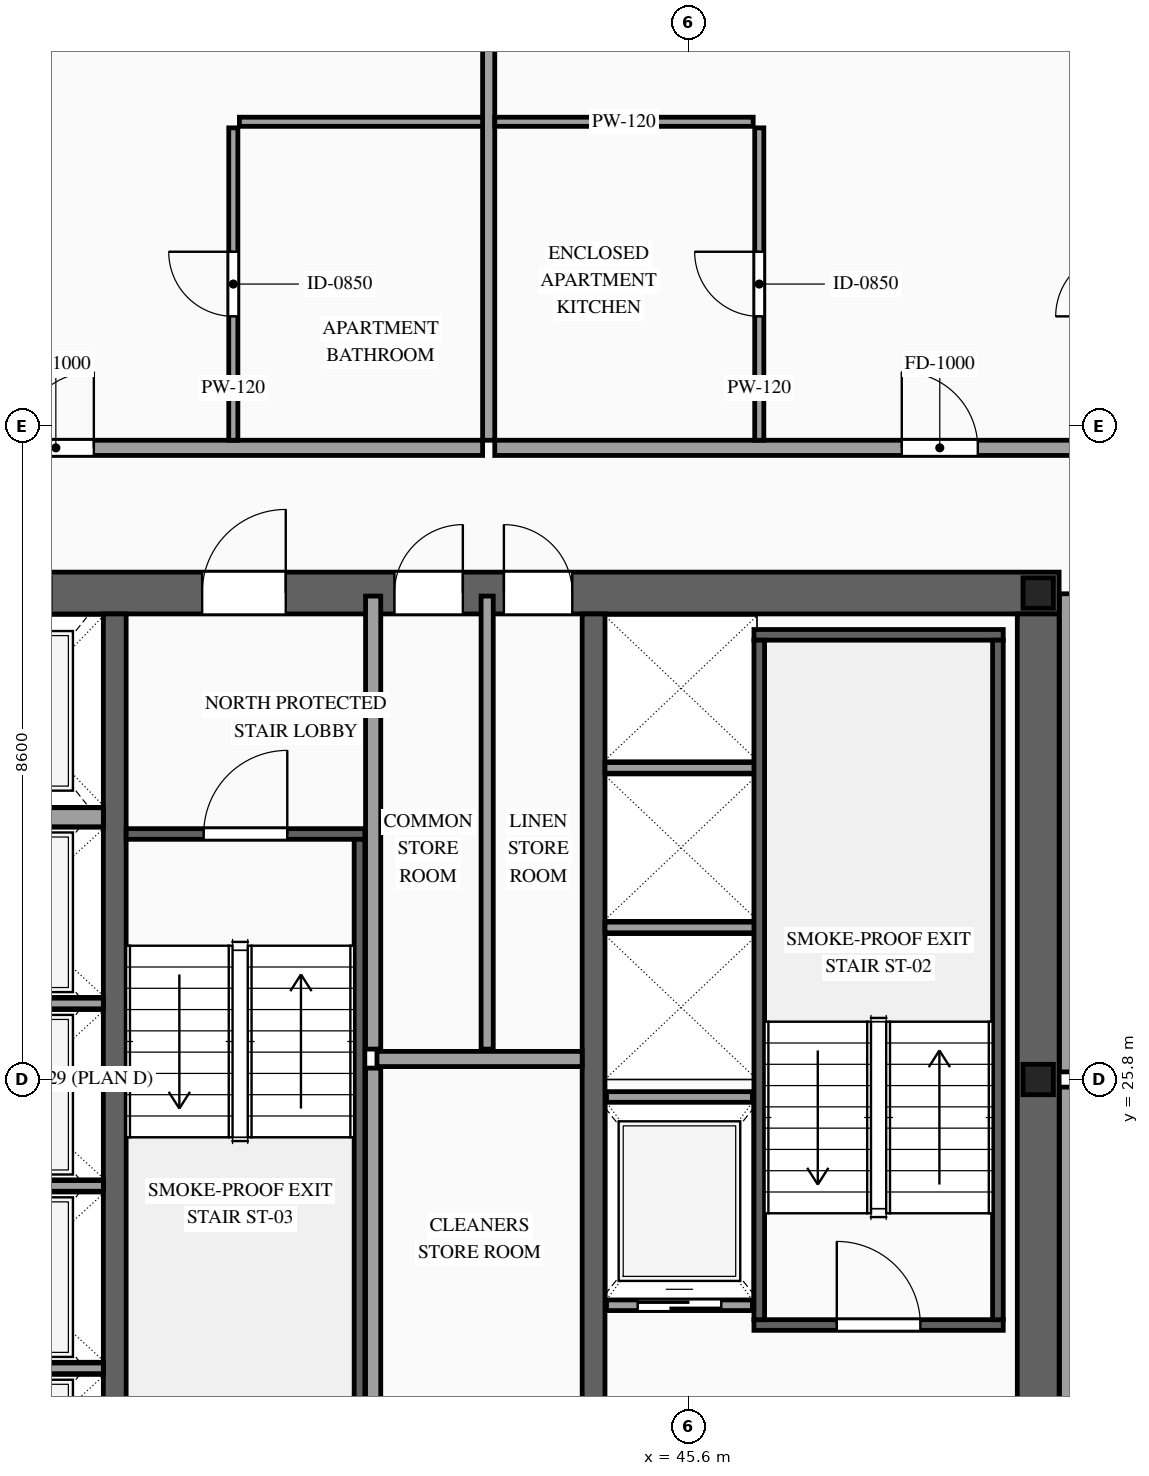
"""IFC4 building model, lengths in metres.
Left out: names, types, materials, properties, quantities, classifications, styles, units other than length and angle.
Written with IfcOpenShell. Run it as: python <this file> out.ifc"""

import sys

from ifc_helpers import new_model, si_unit, direction, frame, frame_2d, origin, origin_2d, place, context, subcontext, project, spatial, rectangle, i_section, extrude, source, transform, mapped, element, fill, save


model = new_model("IFC4")
c1 = context("Model", 3, precision=1e-05, world=origin(), true_north=direction((0.0, 1.0)))
c2 = subcontext(c1, "Body", "Model", "MODEL_VIEW")
j1 = project(units=[si_unit("LENGTHUNIT", "METRE"), si_unit("PLANEANGLEUNIT", "RADIAN")], contexts=[c1])
p1 = place(None, origin())
s1 = spatial("IfcSite", under=j1, at=p1, CompositionType="ELEMENT")
p2 = place(p1, origin())
s2 = spatial("IfcBuilding", under=s1, at=p2, CompositionType="ELEMENT")
p3 = place(p2, frame((0.0, 0.0, 241.6)))
s3 = spatial("IfcBuildingStorey", under=s2, at=p3, CompositionType="ELEMENT", Elevation=241.6)
p4 = place(p3, frame((23.525, 32.2, 0.0), z_axis=(0.0, 0.0, 1.0), x_axis=(1.0, 0.0, 0.0)))
e1 = element("IfcWall", 1, at=p4, inside=s3, PredefinedType="SHEAR", context=c2, shape_type="SweptSolid", body=[
    extrude(rectangle(XDim=26.95, YDim=0.55, at=frame_2d((13.475, 0.0))), origin(), (0.0, 0.0, 1.0), 3.5),
])
p5 = place(p4, frame((4.545, 0.0, 0.0)))
e2 = element("IfcOpeningElement", 2, at=p5, cuts=e1, PredefinedType="OPENING", context=c2, shape_type="SweptSolid", body=[
    extrude(rectangle(XDim=0.9, YDim=2.15, at=frame_2d((0.45, 1.075))), frame((0.0, 0.29, 0.0), z_axis=(0.0, -1.0, 0.0), x_axis=(1.0, 0.0, 0.0)), (0.0, 0.0, 1.0), 0.58),
])
p6 = place(p4, frame((9.825, 0.0, 0.0)))
e3 = element("IfcOpeningElement", 3, at=p6, cuts=e1, PredefinedType="OPENING", context=c2, shape_type="SweptSolid", body=[
    extrude(rectangle(XDim=1.1, YDim=2.2, at=frame_2d((0.55, 1.1))), frame((0.0, 0.29, 0.0), z_axis=(0.0, -1.0, 0.0), x_axis=(1.0, 0.0, 0.0)), (0.0, 0.0, 1.0), 0.58),
])
p7 = place(p4, frame((15.675, 0.0, 0.0)))
e4 = element("IfcOpeningElement", 4, at=p7, cuts=e1, PredefinedType="OPENING", context=c2, shape_type="SweptSolid", body=[
    extrude(rectangle(XDim=1.1, YDim=2.2, at=frame_2d((0.55, 1.1))), frame((0.0, 0.29, 0.0), z_axis=(0.0, -1.0, 0.0), x_axis=(1.0, 0.0, 0.0)), (0.0, 0.0, 1.0), 0.58),
])
p8 = place(p4, frame((18.205, 0.0, 0.0)))
e5 = element("IfcOpeningElement", 5, at=p8, cuts=e1, PredefinedType="OPENING", context=c2, shape_type="SweptSolid", body=[
    extrude(rectangle(XDim=0.9, YDim=2.15, at=frame_2d((0.45, 1.075))), frame((0.0, 0.29, 0.0), z_axis=(0.0, -1.0, 0.0), x_axis=(1.0, 0.0, 0.0)), (0.0, 0.0, 1.0), 0.58),
])
p9 = place(p4, frame((19.645, 0.0, 0.0)))
e6 = element("IfcOpeningElement", 6, at=p9, cuts=e1, PredefinedType="OPENING", context=c2, shape_type="SweptSolid", body=[
    extrude(rectangle(XDim=0.9, YDim=2.15, at=frame_2d((0.45, 1.075))), frame((0.0, 0.29, 0.0), z_axis=(0.0, -1.0, 0.0), x_axis=(1.0, 0.0, 0.0)), (0.0, 0.0, 1.0), 0.58),
])
m1 = source(origin(), c2, "Body", "SweptSolid", [
    extrude(rectangle(XDim=12.25, YDim=0.55, at=frame_2d((6.125, 0.0))), origin(), (0.0, 0.0, 1.0), 3.5),
])
p10 = place(p3, frame((50.2, 19.675, 0.0), z_axis=(0.0, 0.0, 1.0), x_axis=(0.0, 1.0, 0.0)))
e7 = element("IfcWall", 7, at=p10, inside=s3, PredefinedType="SHEAR", context=c2, shape_type="MappedRepresentation", body=[
    mapped(m1, transform((0.0, 0.0, 0.0), scale=1.0)),
])
m2 = source(origin(), c2, "Body", "SweptSolid", [
    extrude(rectangle(XDim=12.25, YDim=0.3, at=frame_2d((6.125, 0.0))), origin(), (0.0, 0.0, 1.0), 3.5),
])
for number, where, z_axis, x_axis in (
    (8, (38.05, 19.675, 0.0), (0.0, 0.0, 1.0), (0.0, 1.0, 0.0)),
    (9, (44.35, 19.675, 0.0), (0.0, 0.0, 1.0), (0.0, 1.0, 0.0)),
):
    element("IfcWall", number, at=place(p3, frame(where, z_axis=z_axis, x_axis=x_axis)), inside=s3, PredefinedType="SOLIDWALL", context=c2, shape_type="MappedRepresentation", body=[
        mapped(m2, transform((0.0, 0.0, 0.0), scale=1.0)),
    ])
m3 = source(origin(), c2, "Body", "SweptSolid", [
    extrude(i_section(OverallWidth=0.4, OverallDepth=0.4, WebThickness=0.013, FlangeThickness=0.021, at=origin_2d()), origin(), (0.0, 0.0, 1.0), 3.5),
])
for number, where, z_axis, x_axis in (
    (10, (50.2, 25.8, 0.0), (0.0, 0.0, 1.0), (1.0, 0.0, 0.0)),
    (11, (50.2, 32.2, 0.0), (0.0, 0.0, 1.0), (1.0, 0.0, 0.0)),
):
    element("IfcColumn", number, at=place(p3, frame(where, z_axis=z_axis, x_axis=x_axis)), inside=s3, PredefinedType="COLUMN", context=c2, shape_type="MappedRepresentation", body=[
        mapped(m3, transform((0.0, 0.0, 0.0), scale=1.0)),
    ])
p11 = place(p3, frame((44.52, 22.83, 0.0), z_axis=(0.0, 0.0, 1.0), x_axis=(1.0, 0.0, 0.0)))
e12 = element("IfcWall", 12, at=p11, inside=s3, PredefinedType="SOLIDWALL", context=c2, shape_type="SweptSolid", body=[
    extrude(rectangle(XDim=1.92, YDim=0.14, at=frame_2d((0.96, 0.0))), origin(), (0.0, 0.0, 1.0), 3.28),
])
p12 = place(p11, frame((0.41, 0.0, 0.0)))
e13 = element("IfcOpeningElement", 13, at=p12, cuts=e12, PredefinedType="OPENING", context=c2, shape_type="SweptSolid", body=[
    extrude(rectangle(XDim=1.1, YDim=2.2, at=frame_2d((0.55, 1.1))), frame((0.0, 0.085, 0.0), z_axis=(0.0, -1.0, 0.0), x_axis=(1.0, 0.0, 0.0)), (0.0, 0.0, 1.0), 0.17),
])
m4 = source(origin(), c2, "Body", "SweptSolid", [
    extrude(rectangle(XDim=1.92, YDim=0.14, at=frame_2d((0.96, 0.0))), origin(), (0.0, 0.0, 1.0), 3.28),
])
p13 = place(p3, frame((44.52, 25.57, 0.0), z_axis=(0.0, 0.0, 1.0), x_axis=(1.0, 0.0, 0.0)))
e14 = element("IfcWall", 14, at=p13, inside=s3, PredefinedType="SOLIDWALL", context=c2, shape_type="MappedRepresentation", body=[
    mapped(m4, transform((0.0, 0.0, 0.0), scale=1.0)),
])
m5 = source(origin(), c2, "Body", "SweptSolid", [
    extrude(rectangle(XDim=2.4, YDim=0.14, at=frame_2d((1.2, 0.0))), origin(), (0.0, 0.0, 1.0), 3.28),
])
for number, where, z_axis, x_axis in (
    (15, (35.5, 22.0, 0.0), (0.0, 0.0, 1.0), (1.0, 0.0, 0.0)),
    (16, (35.5, 24.4, 0.0), (0.0, 0.0, 1.0), (1.0, 0.0, 0.0)),
    (17, (35.5, 26.8, 0.0), (0.0, 0.0, 1.0), (1.0, 0.0, 0.0)),
):
    element("IfcWall", number, at=place(p3, frame(where, z_axis=z_axis, x_axis=x_axis)), inside=s3, PredefinedType="SOLIDWALL", context=c2, shape_type="MappedRepresentation", body=[
        mapped(m5, transform((0.0, 0.0, 0.0), scale=1.0)),
    ])
m6 = source(origin(), c2, "Body", "SweptSolid", [
    extrude(rectangle(XDim=2.4, YDim=0.25, at=frame_2d((1.2, 0.0))), origin(), (0.0, 0.0, 1.0), 3.28),
])
p14 = place(p3, frame((35.5, 29.25, 0.0), z_axis=(0.0, 0.0, 1.0), x_axis=(1.0, 0.0, 0.0)))
e18 = element("IfcWall", 18, at=p14, inside=s3, PredefinedType="SOLIDWALL", context=c2, shape_type="MappedRepresentation", body=[
    mapped(m6, transform((0.0, 0.0, 0.0), scale=1.0)),
])
m7 = source(origin(), c2, "Body", "SweptSolid", [
    extrude(rectangle(XDim=2.0, YDim=0.14, at=frame_2d((1.0, 0.0))), origin(), (0.0, 0.0, 1.0), 3.28),
])
for number, where, z_axis, x_axis in (
    (19, (44.5, 27.8, 0.0), (0.0, 0.0, 1.0), (1.0, 0.0, 0.0)),
    (20, (44.5, 29.9, 0.0), (0.0, 0.0, 1.0), (1.0, 0.0, 0.0)),
):
    element("IfcWall", number, at=place(p3, frame(where, z_axis=z_axis, x_axis=x_axis)), inside=s3, PredefinedType="SOLIDWALL", context=c2, shape_type="MappedRepresentation", body=[
        mapped(m7, transform((0.0, 0.0, 0.0), scale=1.0)),
    ])
p15 = place(p3, frame((46.46, 22.57, 0.0), z_axis=(0.0, 0.0, 1.0), x_axis=(1.0, 0.0, 0.0)))
e21 = element("IfcWall", 21, at=p15, inside=s3, PredefinedType="SOLIDWALL", context=c2, shape_type="SweptSolid", body=[
    extrude(rectangle(XDim=3.28, YDim=0.14, at=frame_2d((1.64, 0.0))), origin(), (0.0, 0.0, 1.0), 3.28),
])
p16 = place(p15, frame((1.09, 0.0, 0.0)))
e22 = element("IfcOpeningElement", 22, at=p16, cuts=e21, PredefinedType="OPENING", context=c2, shape_type="SweptSolid", body=[
    extrude(rectangle(XDim=1.1, YDim=2.2, at=frame_2d((0.55, 1.1))), frame((0.0, 0.085, 0.0), z_axis=(0.0, -1.0, 0.0), x_axis=(1.0, 0.0, 0.0)), (0.0, 0.0, 1.0), 0.17),
])
m8 = source(origin(), c2, "Body", "SweptSolid", [
    extrude(rectangle(XDim=3.28, YDim=0.14, at=frame_2d((1.64, 0.0))), origin(), (0.0, 0.0, 1.0), 3.28),
])
p17 = place(p3, frame((46.46, 31.65, 0.0), z_axis=(0.0, 0.0, 1.0), x_axis=(1.0, 0.0, 0.0)))
e23 = element("IfcWall", 23, at=p17, inside=s3, PredefinedType="SOLIDWALL", context=c2, shape_type="MappedRepresentation", body=[
    mapped(m8, transform((0.0, 0.0, 0.0), scale=1.0)),
])
m9 = source(origin(), c2, "Body", "SweptSolid", [
    extrude(rectangle(XDim=8.94, YDim=0.14, at=frame_2d((4.47, 0.0))), origin(), (0.0, 0.0, 1.0), 3.28),
])
for number, where, z_axis, x_axis in (
    (24, (46.53, 22.64, 0.0), (0.0, 0.0, 1.0), (0.0, 1.0, 0.0)),
    (25, (49.67, 22.64, 0.0), (0.0, 0.0, 1.0), (0.0, 1.0, 0.0)),
):
    element("IfcWall", number, at=place(p3, frame(where, z_axis=z_axis, x_axis=x_axis)), inside=s3, PredefinedType="SOLIDWALL", context=c2, shape_type="MappedRepresentation", body=[
        mapped(m9, transform((0.0, 0.0, 0.0), scale=1.0)),
    ])
p18 = place(p3, frame((38.2, 29.03, 0.0), z_axis=(0.0, 0.0, 1.0), x_axis=(1.0, 0.0, 0.0)))
e26 = element("IfcWall", 26, at=p18, inside=s3, PredefinedType="SOLIDWALL", context=c2, shape_type="SweptSolid", body=[
    extrude(rectangle(XDim=3.14, YDim=0.14, at=frame_2d((1.57, 0.0))), origin(), (0.0, 0.0, 1.0), 3.28),
])
p19 = place(p18, frame((1.02, 0.0, 0.0)))
e27 = element("IfcOpeningElement", 27, at=p19, cuts=e26, PredefinedType="OPENING", context=c2, shape_type="SweptSolid", body=[
    extrude(rectangle(XDim=1.1, YDim=2.2, at=frame_2d((0.55, 1.1))), frame((0.0, 0.085, 0.0), z_axis=(0.0, -1.0, 0.0), x_axis=(1.0, 0.0, 0.0)), (0.0, 0.0, 1.0), 0.17),
])
m10 = source(origin(), c2, "Body", "SweptSolid", [
    extrude(rectangle(XDim=8.94, YDim=0.14, at=frame_2d((4.47, 0.0))), origin(), (0.0, 0.0, 1.0), 3.28),
])
p20 = place(p3, frame((41.27, 20.02, 0.0), z_axis=(0.0, 0.0, 1.0), x_axis=(0.0, 1.0, 0.0)))
e28 = element("IfcWall", 28, at=p20, inside=s3, PredefinedType="SOLIDWALL", context=c2, shape_type="MappedRepresentation", body=[
    mapped(m10, transform((0.0, 0.0, 0.0), scale=1.0)),
])
m11 = source(origin(), c2, "Body", "SweptSolid", [
    extrude(rectangle(XDim=6.51, YDim=0.2, at=frame_2d((3.255, 0.0))), origin(), (0.0, 0.0, 1.0), 3.28),
])
p21 = place(p3, frame((41.45, 19.44, 0.0), z_axis=(0.0, 0.0, 1.0), x_axis=(0.0, 1.0, 0.0)))
e29 = element("IfcWall", 29, at=p21, inside=s3, PredefinedType="PARTITIONING", context=c2, shape_type="MappedRepresentation", body=[
    mapped(m11, transform((0.0, 0.0, 0.0), scale=1.0)),
])
m12 = source(origin(), c2, "Body", "SweptSolid", [
    extrude(rectangle(XDim=2.7, YDim=0.2, at=frame_2d((1.35, 0.0))), origin(), (0.0, 0.0, 1.0), 3.28),
])
p22 = place(p3, frame((41.5, 26.07, 0.0), z_axis=(0.0, 0.0, 1.0), x_axis=(1.0, 0.0, 0.0)))
e30 = element("IfcWall", 30, at=p22, inside=s3, PredefinedType="PARTITIONING", context=c2, shape_type="MappedRepresentation", body=[
    mapped(m12, transform((0.0, 0.0, 0.0), scale=1.0)),
])
m13 = source(origin(), c2, "Body", "SweptSolid", [
    extrude(rectangle(XDim=5.96, YDim=0.2, at=frame_2d((2.98, 0.0))), origin(), (0.0, 0.0, 1.0), 3.28),
])
p23 = place(p3, frame((41.45, 26.2, 0.0), z_axis=(0.0, 0.0, 1.0), x_axis=(0.0, 1.0, 0.0)))
e31 = element("IfcWall", 31, at=p23, inside=s3, PredefinedType="PARTITIONING", context=c2, shape_type="MappedRepresentation", body=[
    mapped(m13, transform((0.0, 0.0, 0.0), scale=1.0)),
])
m14 = source(origin(), c2, "Body", "SweptSolid", [
    extrude(rectangle(XDim=5.96, YDim=0.16, at=frame_2d((2.98, 0.0))), origin(), (0.0, 0.0, 1.0), 3.28),
])
p24 = place(p3, frame((42.95, 26.2, 0.0), z_axis=(0.0, 0.0, 1.0), x_axis=(0.0, 1.0, 0.0)))
e32 = element("IfcWall", 32, at=p24, inside=s3, PredefinedType="PARTITIONING", context=c2, shape_type="MappedRepresentation", body=[
    mapped(m14, transform((0.0, 0.0, 0.0), scale=1.0)),
])
p25 = place(p3, frame((31.461, 34.11, 0.0), z_axis=(0.0, 0.0, 1.0), x_axis=(1.0, 0.0, 0.0)))
e33 = element("IfcWall", 33, at=p25, inside=s3, PredefinedType="PARTITIONING", context=c2, shape_type="SweptSolid", body=[
    extrude(rectangle(XDim=11.429, YDim=0.2, at=frame_2d((5.714, 0.0))), origin(), (0.0, 0.0, 1.0), 3.28),
])
p26 = place(p25, frame((5.314, 0.0, 0.0)))
e34 = element("IfcOpeningElement", 34, at=p26, cuts=e33, PredefinedType="OPENING", context=c2, shape_type="SweptSolid", body=[
    extrude(rectangle(XDim=1.0, YDim=2.2, at=frame_2d((0.5, 1.1))), frame((0.0, 0.115, 0.0), z_axis=(0.0, -1.0, 0.0), x_axis=(1.0, 0.0, 0.0)), (0.0, 0.0, 1.0), 0.23),
])
m15 = source(origin(), c2, "Body", "SweptSolid", [
    extrude(rectangle(XDim=12.04, YDim=0.16, at=frame_2d((6.02, 0.0))), origin(), (0.0, 0.0, 1.0), 3.28),
])
p27 = place(p3, frame((42.97, 34.21, 0.0), z_axis=(0.0, 0.0, 1.0), x_axis=(0.0, 1.0, 0.0)))
e35 = element("IfcWall", 35, at=p27, inside=s3, PredefinedType="PARTITIONING", context=c2, shape_type="MappedRepresentation", body=[
    mapped(m15, transform((0.0, 0.0, 0.0), scale=1.0)),
])
m16 = source(origin(), c2, "Body", "SweptSolid", [
    extrude(rectangle(XDim=3.2, YDim=0.12, at=frame_2d((1.6, 0.0))), origin(), (0.0, 0.0, 1.0), 3.28),
])
p28 = place(p3, frame((39.69, 38.4, 0.0), z_axis=(0.0, 0.0, 1.0), x_axis=(1.0, 0.0, 0.0)))
e36 = element("IfcWall", 36, at=p28, inside=s3, PredefinedType="PARTITIONING", context=c2, shape_type="MappedRepresentation", body=[
    mapped(m16, transform((0.0, 0.0, 0.0), scale=1.0)),
])
p29 = place(p3, frame((39.61, 34.21, 0.0), z_axis=(0.0, 0.0, 1.0), x_axis=(0.0, 1.0, 0.0)))
e37 = element("IfcWall", 37, at=p29, inside=s3, PredefinedType="PARTITIONING", context=c2, shape_type="SweptSolid", body=[
    extrude(rectangle(XDim=4.11, YDim=0.12, at=frame_2d((2.055, 0.0))), origin(), (0.0, 0.0, 1.0), 3.28),
])
p30 = place(p29, frame((1.63, 0.0, 0.0)))
e38 = element("IfcOpeningElement", 38, at=p30, cuts=e37, PredefinedType="OPENING", context=c2, shape_type="SweptSolid", body=[
    extrude(rectangle(XDim=0.85, YDim=2.1, at=frame_2d((0.425, 1.05))), frame((0.0, 0.075, 0.0), z_axis=(0.0, -1.0, 0.0), x_axis=(1.0, 0.0, 0.0)), (0.0, 0.0, 1.0), 0.15),
])
p31 = place(p3, frame((43.05, 34.11, 0.0), z_axis=(0.0, 0.0, 1.0), x_axis=(1.0, 0.0, 0.0)))
e39 = element("IfcWall", 39, at=p31, inside=s3, PredefinedType="PARTITIONING", context=c2, shape_type="SweptSolid", body=[
    extrude(rectangle(XDim=11.51, YDim=0.2, at=frame_2d((5.755, 0.0))), origin(), (0.0, 0.0, 1.0), 3.28),
])
p32 = place(p31, frame((5.355, 0.0, 0.0)))
e40 = element("IfcOpeningElement", 40, at=p32, cuts=e39, PredefinedType="OPENING", context=c2, shape_type="SweptSolid", body=[
    extrude(rectangle(XDim=1.0, YDim=2.2, at=frame_2d((0.5, 1.1))), frame((0.0, 0.115, 0.0), z_axis=(0.0, -1.0, 0.0), x_axis=(1.0, 0.0, 0.0)), (0.0, 0.0, 1.0), 0.23),
])
m17 = source(origin(), c2, "Body", "SweptSolid", [
    extrude(rectangle(XDim=3.4, YDim=0.12, at=frame_2d((1.7, 0.0))), origin(), (0.0, 0.0, 1.0), 3.28),
])
p33 = place(p3, frame((43.05, 38.4, 0.0), z_axis=(0.0, 0.0, 1.0), x_axis=(1.0, 0.0, 0.0)))
e41 = element("IfcWall", 41, at=p33, inside=s3, PredefinedType="PARTITIONING", context=c2, shape_type="MappedRepresentation", body=[
    mapped(m17, transform((0.0, 0.0, 0.0), scale=1.0)),
])
p34 = place(p3, frame((46.53, 34.21, 0.0), z_axis=(0.0, 0.0, 1.0), x_axis=(0.0, 1.0, 0.0)))
e42 = element("IfcWall", 42, at=p34, inside=s3, PredefinedType="PARTITIONING", context=c2, shape_type="SweptSolid", body=[
    extrude(rectangle(XDim=4.11, YDim=0.12, at=frame_2d((2.055, 0.0))), origin(), (0.0, 0.0, 1.0), 3.28),
])
p35 = place(p34, frame((1.63, 0.0, 0.0)))
e43 = element("IfcOpeningElement", 43, at=p35, cuts=e42, PredefinedType="OPENING", context=c2, shape_type="SweptSolid", body=[
    extrude(rectangle(XDim=0.85, YDim=2.1, at=frame_2d((0.425, 1.05))), frame((0.0, 0.075, 0.0), z_axis=(0.0, -1.0, 0.0), x_axis=(1.0, 0.0, 0.0)), (0.0, 0.0, 1.0), 0.15),
])
m18 = source(origin(), c2, "Body", "SweptSolid", [
    extrude(rectangle(XDim=6.29, YDim=0.2, at=frame_2d((3.145, 0.0))), origin(), (0.0, 0.0, 1.0), 3.28),
])
for number, where, z_axis, x_axis in (
    (44, (50.58, 19.41, 0.0), (0.0, 0.0, 1.0), (0.0, 1.0, 0.0)),
    (45, (50.58, 25.9, 0.0), (0.0, 0.0, 1.0), (0.0, 1.0, 0.0)),
):
    element("IfcWall", number, at=place(p3, frame(where, z_axis=z_axis, x_axis=x_axis)), inside=s3, PredefinedType="PARTITIONING", context=c2, shape_type="MappedRepresentation", body=[
        mapped(m18, transform((0.0, 0.0, 0.0), scale=1.0)),
    ])
m19 = source(origin(), c2, "Body", "SweptSolid", [
    extrude(rectangle(XDim=1.1, YDim=2.2, at=frame_2d((0.55, 1.1))), frame((0.0, 0.025, 0.0), z_axis=(0.0, -1.0, 0.0), x_axis=(1.0, 0.0, 0.0)), (0.0, 0.0, 1.0), 0.05),
])
p36 = place(p12, origin())
e46 = element("IfcDoor", 46, at=p36, inside=s3, OperationType="SLIDING_TO_RIGHT", PredefinedType="DOOR", context=c2, shape_type="MappedRepresentation", body=[
    mapped(m19, transform((0.0, 0.0, 0.0), scale=1.0)),
])
fill(e13, e46)
m20 = source(origin(), c2, "Body", "SweptSolid", [
    extrude(rectangle(XDim=1.1, YDim=2.2, at=frame_2d((0.55, 1.1))), frame((0.0, 0.025, 0.0), z_axis=(0.0, -1.0, 0.0), x_axis=(1.0, 0.0, 0.0)), (0.0, 0.0, 1.0), 0.05),
])
p37 = place(p16, origin())
e47 = element("IfcDoor", 47, at=p37, inside=s3, OperationType="SINGLE_SWING_LEFT", PredefinedType="DOOR", context=c2, shape_type="MappedRepresentation", body=[
    mapped(m20, transform((0.0, 0.0, 0.0), scale=1.0)),
])
fill(e22, e47)
p38 = place(p19, origin())
e48 = element("IfcDoor", 48, at=p38, inside=s3, OperationType="SINGLE_SWING_RIGHT", PredefinedType="DOOR", context=c2, shape_type="MappedRepresentation", body=[
    mapped(m20, transform((0.0, 0.0, 0.0), scale=1.0)),
])
fill(e27, e48)
p39 = place(p7, origin())
e49 = element("IfcDoor", 49, at=p39, inside=s3, OperationType="SINGLE_SWING_RIGHT", PredefinedType="DOOR", context=c2, shape_type="MappedRepresentation", body=[
    mapped(m20, transform((0.0, 0.0, 0.0), scale=1.0)),
])
fill(e4, e49)
m21 = source(origin(), c2, "Body", "SweptSolid", [
    extrude(rectangle(XDim=0.9, YDim=2.15, at=frame_2d((0.45, 1.075))), frame((0.0, 0.025, 0.0), z_axis=(0.0, -1.0, 0.0), x_axis=(1.0, 0.0, 0.0)), (0.0, 0.0, 1.0), 0.05),
])
p40 = place(p8, origin())
e50 = element("IfcDoor", 50, at=p40, inside=s3, OperationType="SINGLE_SWING_RIGHT", PredefinedType="DOOR", context=c2, shape_type="MappedRepresentation", body=[
    mapped(m21, transform((0.0, 0.0, 0.0), scale=1.0)),
])
fill(e5, e50)
p41 = place(p9, origin())
e51 = element("IfcDoor", 51, at=p41, inside=s3, OperationType="SINGLE_SWING_LEFT", PredefinedType="DOOR", context=c2, shape_type="MappedRepresentation", body=[
    mapped(m21, transform((0.0, 0.0, 0.0), scale=1.0)),
])
fill(e6, e51)
m22 = source(origin(), c2, "Body", "SweptSolid", [
    extrude(rectangle(XDim=1.0, YDim=2.2, at=frame_2d((0.5, 1.1))), frame((0.0, 0.025, 0.0), z_axis=(0.0, -1.0, 0.0), x_axis=(1.0, 0.0, 0.0)), (0.0, 0.0, 1.0), 0.05),
])
p42 = place(p26, origin())
e52 = element("IfcDoor", 52, at=p42, inside=s3, OperationType="SINGLE_SWING_RIGHT", PredefinedType="DOOR", context=c2, shape_type="MappedRepresentation", body=[
    mapped(m22, transform((0.0, 0.0, 0.0), scale=1.0)),
])
fill(e34, e52)
m23 = source(origin(), c2, "Body", "SweptSolid", [
    extrude(rectangle(XDim=0.85, YDim=2.1, at=frame_2d((0.425, 1.05))), frame((0.0, 0.025, 0.0), z_axis=(0.0, -1.0, 0.0), x_axis=(1.0, 0.0, 0.0)), (0.0, 0.0, 1.0), 0.05),
])
p43 = place(p30, origin())
e53 = element("IfcDoor", 53, at=p43, inside=s3, OperationType="SINGLE_SWING_RIGHT", PredefinedType="DOOR", context=c2, shape_type="MappedRepresentation", body=[
    mapped(m23, transform((0.0, 0.0, 0.0), scale=1.0)),
])
fill(e38, e53)
p44 = place(p32, origin())
e54 = element("IfcDoor", 54, at=p44, inside=s3, OperationType="SINGLE_SWING_LEFT", PredefinedType="DOOR", context=c2, shape_type="MappedRepresentation", body=[
    mapped(m22, transform((0.0, 0.0, 0.0), scale=1.0)),
])
fill(e40, e54)
p45 = place(p35, origin())
e55 = element("IfcDoor", 55, at=p45, inside=s3, OperationType="SINGLE_SWING_RIGHT", PredefinedType="DOOR", context=c2, shape_type="MappedRepresentation", body=[
    mapped(m23, transform((0.0, 0.0, 0.0), scale=1.0)),
])
fill(e43, e55)
save(model, sys.argv[1])
